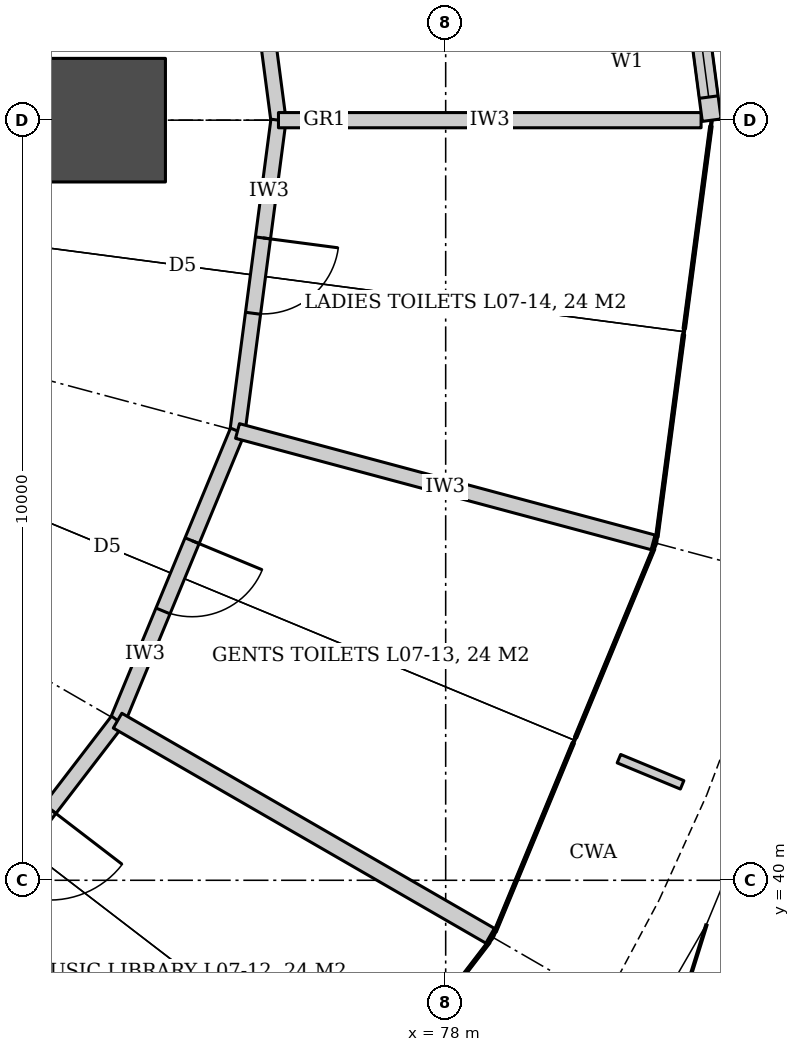
"""IFC4 building model, lengths in metres.
Left out: names, types, materials, properties, quantities, classifications, styles, units other than length and angle.
Written with IfcOpenShell. Run it as: python <this file> out.ifc"""

import sys

from ifc_helpers import new_model, si_unit, direction, frame, frame_2d, origin, origin_2d, place, context, subcontext, project, spatial, rectangle, hollow_circle, extrude, element, fill, save


model = new_model("IFC4")
c1 = context("Model", 3, precision=1e-05, world=origin(), true_north=direction((0.0, 1.0)))
c2 = subcontext(c1, "Body", "Model", "MODEL_VIEW")
j1 = project(units=[si_unit("LENGTHUNIT", "METRE"), si_unit("PLANEANGLEUNIT", "RADIAN")], contexts=[c1])
p1 = place(None, origin())
s1 = spatial("IfcSite", under=j1, at=p1, CompositionType="ELEMENT")
p2 = place(p1, origin())
s2 = spatial("IfcBuilding", under=s1, at=p2, CompositionType="ELEMENT")
p3 = place(p2, frame((0.0, 0.0, 30.2)))
s3 = spatial("IfcBuildingStorey", under=s2, at=p3, CompositionType="ELEMENT", Elevation=30.2)
p4 = place(p3, frame((73.5, 50.0, 0.0), z_axis=(0.0, 0.0, 1.0), x_axis=(1.0, 0.0, 0.0)))
e1 = element("IfcColumn", 1, at=p4, inside=s3, PredefinedType="COLUMN", context=c2, shape_type="SweptSolid", body=[
    extrude(hollow_circle(Radius=0.813, WallThickness=0.08, at=origin_2d()), origin(), (0.0, 0.0, 1.0), 4.2),
])
p5 = place(p3, frame((75.262, 54.089, 0.0), z_axis=(0.0, 0.0, 1.0), x_axis=(0.130515758099, -0.991446234996, 0.0)))
e2 = element("IfcWall", 2, at=p5, inside=s3, PredefinedType="PARTITIONING", context=c2, shape_type="SweptSolid", body=[
    extrude(rectangle(XDim=4.125, YDim=0.2, at=frame_2d((2.062, 0.0))), origin(), (0.0, 0.0, 1.0), 3.04),
])
p6 = place(p3, frame((75.8, 50.0, 0.0), z_axis=(0.0, 0.0, 1.0), x_axis=(-0.130515758099, -0.991446234996, 0.0)))
e3 = element("IfcWall", 3, at=p6, inside=s3, PredefinedType="PARTITIONING", context=c2, shape_type="SweptSolid", body=[
    extrude(rectangle(XDim=4.125, YDim=0.2, at=frame_2d((2.062, 0.0))), origin(), (0.0, 0.0, 1.0), 3.04),
])
p7 = place(p6, frame((1.562, 0.0, 0.0)))
e4 = element("IfcOpeningElement", 4, at=p7, cuts=e3, PredefinedType="OPENING", context=c2, shape_type="SweptSolid", body=[
    extrude(rectangle(XDim=1.0, YDim=2.1, at=frame_2d((0.5, 1.05))), frame((0.0, 0.11, 0.0), z_axis=(0.0, -1.0, 0.0), x_axis=(1.0, 0.0, 0.0)), (0.0, 0.0, 1.0), 0.22),
])
p8 = place(p3, frame((75.262, 45.911, 0.0), z_axis=(0.0, 0.0, 1.0), x_axis=(-0.382731667114, -0.923859551549, 0.0)))
e5 = element("IfcWall", 5, at=p8, inside=s3, PredefinedType="PARTITIONING", context=c2, shape_type="SweptSolid", body=[
    extrude(rectangle(XDim=4.125, YDim=0.2, at=frame_2d((2.062, 0.0))), origin(), (0.0, 0.0, 1.0), 3.04),
])
p9 = place(p8, frame((1.562, 0.0, 0.0)))
e6 = element("IfcOpeningElement", 6, at=p9, cuts=e5, PredefinedType="OPENING", context=c2, shape_type="SweptSolid", body=[
    extrude(rectangle(XDim=1.0, YDim=2.1, at=frame_2d((0.5, 1.05))), frame((0.0, 0.11, 0.0), z_axis=(0.0, -1.0, 0.0), x_axis=(1.0, 0.0, 0.0)), (0.0, 0.0, 1.0), 0.22),
])
p10 = place(p3, frame((73.683, 42.1, 0.0), z_axis=(0.0, 0.0, 1.0), x_axis=(-0.608714823874, -0.793389099494, 0.0)))
e7 = element("IfcWall", 7, at=p10, inside=s3, PredefinedType="PARTITIONING", context=c2, shape_type="SweptSolid", body=[
    extrude(rectangle(XDim=4.125, YDim=0.2, at=frame_2d((2.062, 0.0))), origin(), (0.0, 0.0, 1.0), 3.04),
])
p11 = place(p10, frame((1.462, 0.0, 0.0)))
e8 = element("IfcOpeningElement", 8, at=p11, cuts=e7, PredefinedType="OPENING", context=c2, shape_type="SweptSolid", body=[
    extrude(rectangle(XDim=1.2, YDim=2.4, at=frame_2d((0.6, 1.2))), frame((0.0, 0.11, 0.0), z_axis=(0.0, -1.0, 0.0), x_axis=(1.0, 0.0, 0.0)), (0.0, 0.0, 1.0), 0.22),
])
p12 = place(p3, frame((75.8, 50.0, 0.0), z_axis=(0.0, 0.0, 1.0), x_axis=(1.0, 0.0, 0.0)))
e9 = element("IfcWall", 9, at=p12, inside=s3, PredefinedType="PARTITIONING", context=c2, shape_type="SweptSolid", body=[
    extrude(rectangle(XDim=4.96, YDim=0.2, at=frame_2d((2.48, 0.0))), origin(), (0.0, 0.0, 1.0), 3.04),
])
p13 = place(p3, frame((68.2, 41.8, 0.0), z_axis=(0.0, 0.0, 1.0), x_axis=(0.707106781187, -0.707106781187, 0.0)))
e10 = element("IfcWall", 10, at=p13, inside=s3, PredefinedType="PARTITIONING", context=c2, shape_type="SweptSolid", body=[
    extrude(rectangle(XDim=9.263, YDim=0.225, at=frame_2d((4.632, 0.0))), origin(), (0.0, 0.0, 1.0), 3.02),
])
p14 = place(p13, frame((1.502, 0.0, 0.0)))
e11 = element("IfcOpeningElement", 11, at=p14, cuts=e10, PredefinedType="OPENING", context=c2, shape_type="SweptSolid", body=[
    extrude(rectangle(XDim=1.2, YDim=2.4, at=frame_2d((0.6, 1.2))), frame((0.0, 0.123, 0.0), z_axis=(0.0, -1.0, 0.0), x_axis=(1.0, 0.0, 0.0)), (0.0, 0.0, 1.0), 0.245),
])
p15 = place(p3, frame((73.683, 42.1, 0.0), z_axis=(0.0, 0.0, 1.0), x_axis=(0.866022478443, -0.500005066806, 0.0)))
e12 = element("IfcWall", 12, at=p15, inside=s3, PredefinedType="PARTITIONING", context=c2, shape_type="SweptSolid", body=[
    extrude(rectangle(XDim=5.06, YDim=0.225, at=frame_2d((2.53, 0.0))), origin(), (0.0, 0.0, 1.0), 3.04),
])
p16 = place(p3, frame((75.262, 45.911, 0.0), z_axis=(0.0, 0.0, 1.0), x_axis=(0.965926729572, -0.258815673981, 0.0)))
e13 = element("IfcWall", 13, at=p16, inside=s3, PredefinedType="PARTITIONING", context=c2, shape_type="SweptSolid", body=[
    extrude(rectangle(XDim=5.06, YDim=0.2, at=frame_2d((2.53, 0.0))), origin(), (0.0, 0.0, 1.0), 3.04),
])
p17 = place(p3, frame((80.9, 50.0, 0.0), z_axis=(0.0, 0.0, 1.0), x_axis=(-0.130525119492, 0.991445002601, 0.0)))
e14 = element("IfcWall", 14, at=p17, inside=s3, PredefinedType="SOLIDWALL", context=c2, shape_type="SweptSolid", body=[
    extrude(rectangle(XDim=5.456, YDim=0.25, at=frame_2d((2.728, 0.0))), origin(), (0.0, 0.0, 1.0), 4.04),
])
p18 = place(p17, frame((1.828, 0.0, 0.0)))
e15 = element("IfcOpeningElement", 15, at=p18, cuts=e14, PredefinedType="OPENING", context=c2, shape_type="SweptSolid", body=[
    extrude(rectangle(XDim=1.8, YDim=2.4, at=frame_2d((0.9, 1.2))), frame((0.0, 0.135, 0.0), z_axis=(0.0, -1.0, 0.0), x_axis=(1.0, 0.0, 0.0)), (0.0, 0.0, 1.0), 0.27),
])
p19 = place(p17, frame((0.228, 0.0, 0.0)))
e16 = element("IfcOpeningElement", 16, at=p19, cuts=e14, PredefinedType="OPENING", context=c2, shape_type="SweptSolid", body=[
    extrude(rectangle(XDim=1.2, YDim=2.4, at=frame_2d((0.6, 1.2))), frame((0.0, 0.135, 0.0), z_axis=(0.0, -1.0, 0.0), x_axis=(1.0, 0.0, 0.0)), (0.0, 0.0, 1.0), 0.27),
])
p20 = place(p17, frame((4.028, 0.0, 0.0)))
e17 = element("IfcOpeningElement", 17, at=p20, cuts=e14, PredefinedType="OPENING", context=c2, shape_type="SweptSolid", body=[
    extrude(rectangle(XDim=1.2, YDim=2.4, at=frame_2d((0.6, 1.2))), frame((0.0, 0.135, 0.0), z_axis=(0.0, -1.0, 0.0), x_axis=(1.0, 0.0, 0.0)), (0.0, 0.0, 1.0), 0.27),
])
p21 = place(p9, origin())
e18 = element("IfcDoor", 18, at=p21, inside=s3, OperationType="SINGLE_SWING_LEFT", PredefinedType="DOOR", context=c2, shape_type="SweptSolid", body=[
    extrude(rectangle(XDim=1.0, YDim=2.1, at=frame_2d((0.5, 1.05))), frame((0.0, 0.025, 0.0), z_axis=(0.0, -1.0, 0.0), x_axis=(1.0, 0.0, 0.0)), (0.0, 0.0, 1.0), 0.05),
])
fill(e6, e18)
p22 = place(p7, origin())
e19 = element("IfcDoor", 19, at=p22, inside=s3, OperationType="SINGLE_SWING_LEFT", PredefinedType="DOOR", context=c2, shape_type="SweptSolid", body=[
    extrude(rectangle(XDim=1.0, YDim=2.1, at=frame_2d((0.5, 1.05))), frame((0.0, 0.025, 0.0), z_axis=(0.0, -1.0, 0.0), x_axis=(1.0, 0.0, 0.0)), (0.0, 0.0, 1.0), 0.05),
])
fill(e4, e19)
p23 = place(p19, origin())
e20 = element("IfcWindow", 20, at=p23, inside=s3, PartitioningType="SINGLE_PANEL", PredefinedType="WINDOW", context=c2, shape_type="SweptSolid", body=[
    extrude(rectangle(XDim=1.2, YDim=2.4, at=frame_2d((0.6, 1.2))), frame((0.0, 0.03, 0.0), z_axis=(0.0, -1.0, 0.0), x_axis=(1.0, 0.0, 0.0)), (0.0, 0.0, 1.0), 0.06),
])
fill(e16, e20)
save(model, sys.argv[1])
